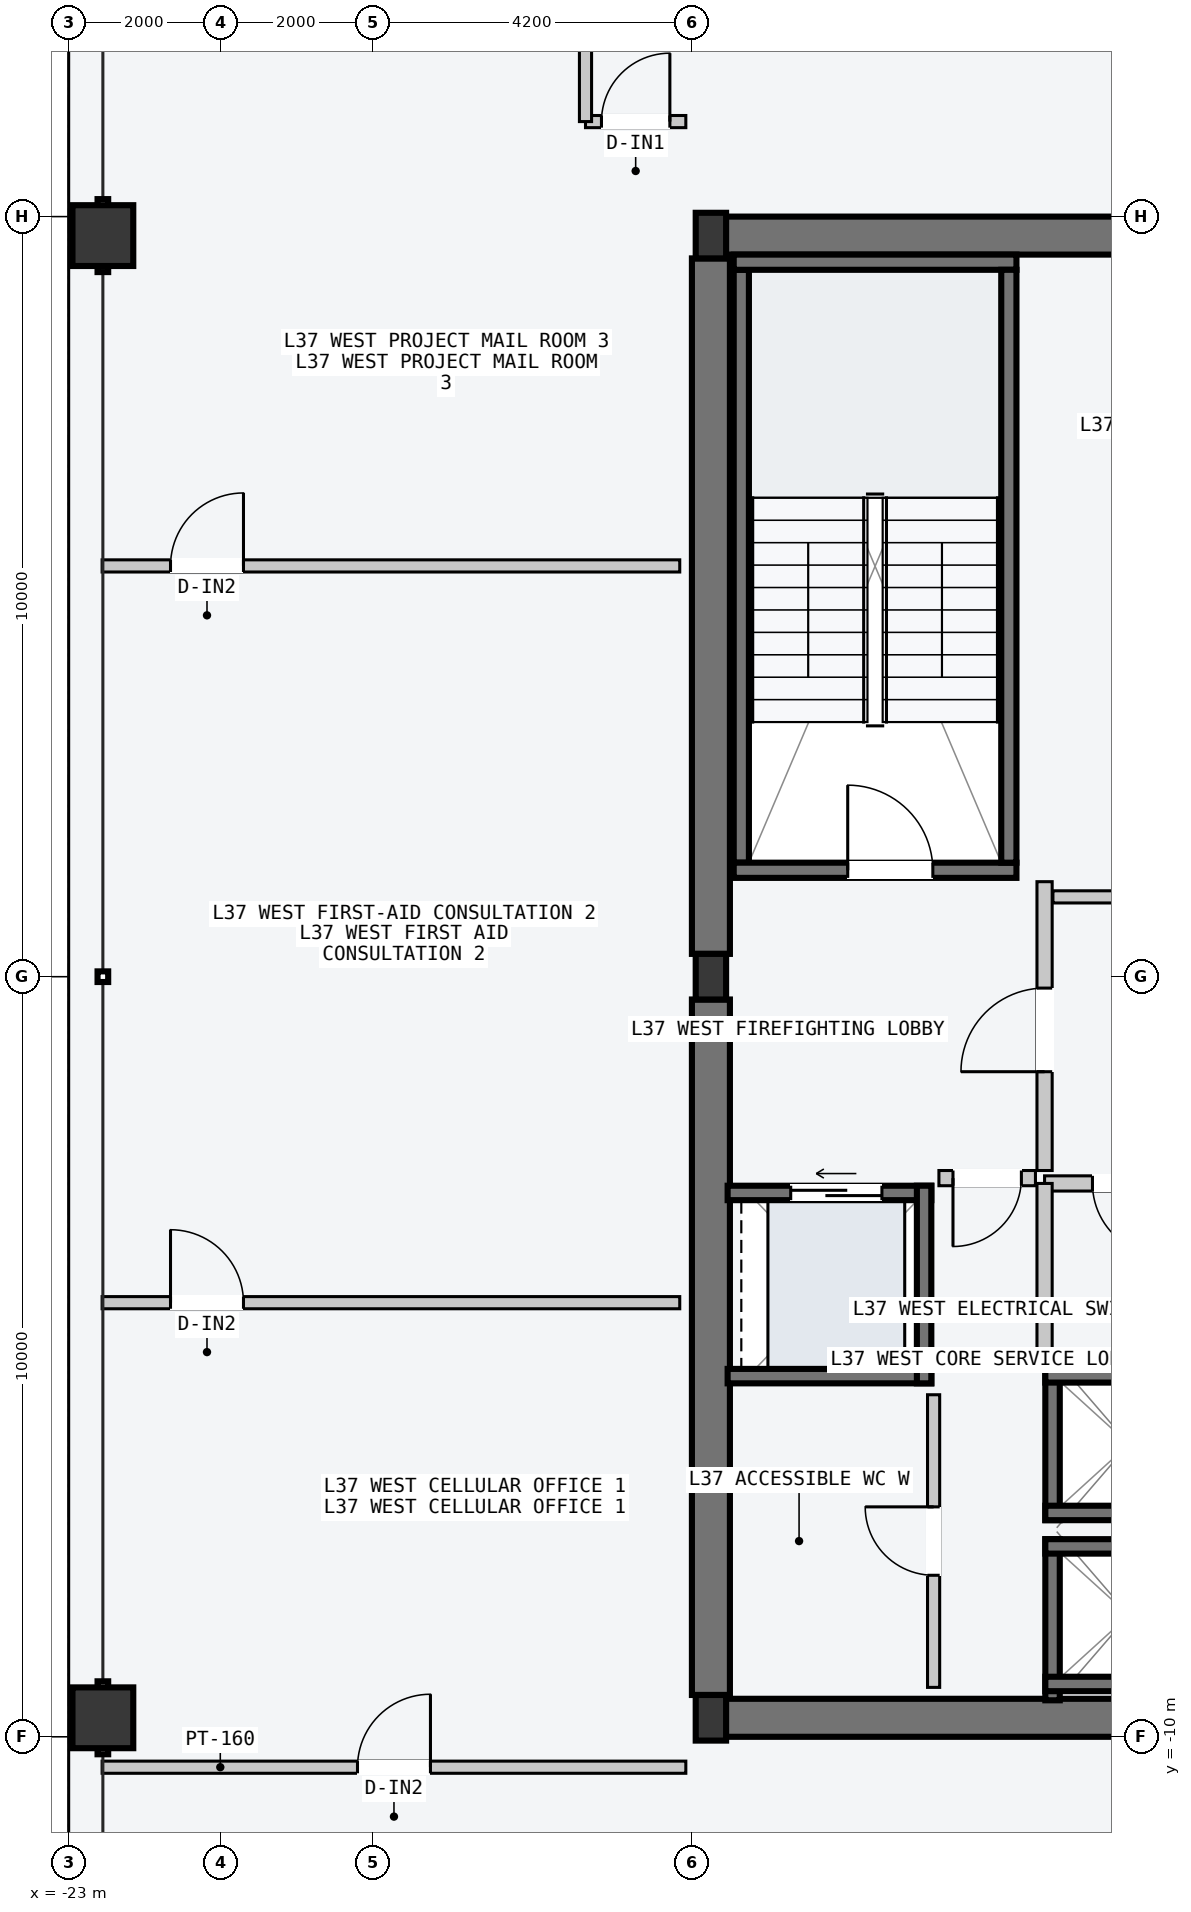
"""IFC4 building model, lengths in metres.
Left out: names, types, materials, properties, quantities, classifications, styles, units other than length and angle.
Written with IfcOpenShell. Run it as: python <this file> out.ifc"""

import sys

from ifc_helpers import new_model, si_unit, direction, frame, frame_2d, origin, origin_2d, place, context, subcontext, project, spatial, rectangle, hollow_rectangle, i_section, extrude, element, fill, save


model = new_model("IFC4")
c1 = context("Model", 3, precision=1e-05, world=origin(), true_north=direction((0.0, 1.0)))
c2 = subcontext(c1, "Body", "Model", "MODEL_VIEW")
j1 = project(units=[si_unit("LENGTHUNIT", "METRE"), si_unit("PLANEANGLEUNIT", "RADIAN")], contexts=[c1])
p1 = place(None, origin())
s1 = spatial("IfcSite", under=j1, at=p1, CompositionType="ELEMENT")
p2 = place(p1, origin())
s2 = spatial("IfcBuilding", under=s1, at=p2, CompositionType="ELEMENT")
p3 = place(p2, frame((0.0, 0.0, 142.2)))
s3 = spatial("IfcBuildingStorey", under=s2, at=p3, CompositionType="ELEMENT", Elevation=142.2)
for number, where, z_axis, x_axis in (
    (1, (-14.53, -9.75, -0.2), (0.0, 0.0, 1.0), (1.0, 0.0, 0.0)),
    (2, (-14.53, 9.75, -0.2), (0.0, 0.0, 1.0), (1.0, 0.0, 0.0)),
):
    element("IfcWall", number, at=place(p3, frame(where, z_axis=z_axis, x_axis=x_axis)), inside=s3, PredefinedType="SHEAR", context=c2, shape_type="SweptSolid", body=[
        extrude(rectangle(XDim=6.46, YDim=0.5, at=frame_2d((3.23, 0.0))), origin(), (0.0, 0.0, 1.0), 3.6),
    ])
for number, where, z_axis, x_axis in (
    (3, (-14.55, -9.45, -0.2), (0.0, 0.0, 1.0), (0.0, 1.0, 0.0)),
    (4, (-14.55, 0.3, -0.2), (0.0, 0.0, 1.0), (0.0, 1.0, 0.0)),
):
    element("IfcWall", number, at=place(p3, frame(where, z_axis=z_axis, x_axis=x_axis)), inside=s3, PredefinedType="SHEAR", context=c2, shape_type="SweptSolid", body=[
        extrude(rectangle(XDim=9.15, YDim=0.5, at=frame_2d((4.575, 0.0))), origin(), (0.0, 0.0, 1.0), 3.6),
    ])
p4 = place(p3, frame((-14.15, 1.5, -0.2), z_axis=(0.0, 0.0, 1.0), x_axis=(0.0, 1.0, 0.0)))
e5 = element("IfcWall", 5, at=p4, inside=s3, PredefinedType="SOLIDWALL", context=c2, shape_type="SweptSolid", body=[
    extrude(rectangle(XDim=7.8, YDim=0.2, at=frame_2d((3.9, 0.0))), origin(), (0.0, 0.0, 1.0), 3.6),
])
p5 = place(p3, frame((-14.25, 1.4, -0.2), z_axis=(0.0, 0.0, 1.0), x_axis=(1.0, 0.0, 0.0)))
e6 = element("IfcWall", 6, at=p5, inside=s3, PredefinedType="SOLIDWALL", context=c2, shape_type="SweptSolid", body=[
    extrude(rectangle(XDim=3.72, YDim=0.2, at=frame_2d((1.86, 0.0))), origin(), (0.0, 0.0, 1.0), 3.6),
])
p6 = place(p5, frame((1.5, 0.0, 0.2)))
e7 = element("IfcOpeningElement", 7, at=p6, cuts=e6, PredefinedType="OPENING", context=c2, shape_type="SweptSolid", body=[
    extrude(rectangle(XDim=1.12, YDim=2.18, at=frame_2d((0.56, 1.09))), frame((0.0, 0.11, 0.0), z_axis=(0.0, -1.0, 0.0), x_axis=(1.0, 0.0, 0.0)), (0.0, 0.0, 1.0), 0.22),
])
p7 = place(p3, frame((-14.25, 9.4, -0.2), z_axis=(0.0, 0.0, 1.0), x_axis=(1.0, 0.0, 0.0)))
e8 = element("IfcWall", 8, at=p7, inside=s3, PredefinedType="SOLIDWALL", context=c2, shape_type="SweptSolid", body=[
    extrude(rectangle(XDim=3.72, YDim=0.2, at=frame_2d((1.86, 0.0))), origin(), (0.0, 0.0, 1.0), 3.6),
])
p8 = place(p3, frame((-10.63, 1.5, -0.2), z_axis=(0.0, 0.0, 1.0), x_axis=(0.0, 1.0, 0.0)))
e9 = element("IfcWall", 9, at=p8, inside=s3, PredefinedType="SOLIDWALL", context=c2, shape_type="SweptSolid", body=[
    extrude(rectangle(XDim=7.8, YDim=0.2, at=frame_2d((3.9, 0.0))), origin(), (0.0, 0.0, 1.0), 3.6),
])
for number, where, z_axis, x_axis in (
    (10, (-14.55, -9.75, 0.0), (0.0, 0.0, 1.0), (1.0, 0.0, 0.0)),
    (11, (-14.55, 0.0, 0.0), (0.0, 0.0, 1.0), (1.0, 0.0, 0.0)),
    (12, (-14.55, 9.75, 0.0), (0.0, 0.0, 1.0), (1.0, 0.0, 0.0)),
):
    element("IfcColumn", number, at=place(p3, frame(where, z_axis=z_axis, x_axis=x_axis)), inside=s3, PredefinedType="COLUMN", context=c2, shape_type="SweptSolid", body=[
        extrude(i_section(OverallWidth=0.4, OverallDepth=0.6, WebThickness=0.022, FlangeThickness=0.036, at=origin_2d()), origin(), (0.0, 0.0, 1.0), 3.6),
    ])
for number, where, z_axis, x_axis in (
    (13, (-22.55, -9.75, 0.0), (0.0, 0.0, 1.0), (0.0, 1.0, 0.0)),
    (14, (-22.55, 9.75, 0.0), (0.0, 0.0, 1.0), (0.0, 1.0, 0.0)),
):
    element("IfcColumn", number, at=place(p3, frame(where, z_axis=z_axis, x_axis=x_axis)), inside=s3, PredefinedType="COLUMN", context=c2, shape_type="SweptSolid", body=[
        extrude(hollow_rectangle(XDim=0.8, YDim=0.8, WallThickness=0.036, at=origin_2d()), origin(), (0.0, 0.0, 1.0), 3.6),
    ])
p9 = place(p3, frame((-10.055, -9.52, -0.2), z_axis=(0.0, 0.0, 1.0), x_axis=(0.0, 1.0, 0.0)))
e15 = element("IfcWall", 15, at=p9, inside=s3, PredefinedType="SOLIDWALL", context=c2, shape_type="SweptSolid", body=[
    extrude(rectangle(XDim=2.12, YDim=0.19, at=frame_2d((1.06, 0.0))), origin(), (0.0, 0.0, 1.0), 3.6),
])
for number, where, z_axis, x_axis in (
    (16, (-10.15, -7.495, -0.2), (0.0, 0.0, 1.0), (1.0, 0.0, 0.0)),
    (17, (-10.15, -9.305, -0.2), (0.0, 0.0, 1.0), (1.0, 0.0, 0.0)),
):
    element("IfcWall", number, at=place(p3, frame(where, z_axis=z_axis, x_axis=x_axis)), inside=s3, PredefinedType="SOLIDWALL", context=c2, shape_type="SweptSolid", body=[
        extrude(rectangle(XDim=2.2, YDim=0.19, at=frame_2d((1.1, 0.0))), origin(), (0.0, 0.0, 1.0), 3.6),
    ])
p10 = place(p3, frame((-10.055, -7.15, -0.2), z_axis=(0.0, 0.0, 1.0), x_axis=(0.0, 1.0, 0.0)))
e18 = element("IfcWall", 18, at=p10, inside=s3, PredefinedType="SOLIDWALL", context=c2, shape_type="SweptSolid", body=[
    extrude(rectangle(XDim=2.0, YDim=0.19, at=frame_2d((1.0, 0.0))), origin(), (0.0, 0.0, 1.0), 3.6),
])
for number, where, z_axis, x_axis in (
    (19, (-10.15, -5.245, -0.2), (0.0, 0.0, 1.0), (1.0, 0.0, 0.0)),
    (20, (-10.15, -7.055, -0.2), (0.0, 0.0, 1.0), (1.0, 0.0, 0.0)),
):
    element("IfcWall", number, at=place(p3, frame(where, z_axis=z_axis, x_axis=x_axis)), inside=s3, PredefinedType="SOLIDWALL", context=c2, shape_type="SweptSolid", body=[
        extrude(rectangle(XDim=2.2, YDim=0.19, at=frame_2d((1.1, 0.0))), origin(), (0.0, 0.0, 1.0), 3.6),
    ])
p11 = place(p3, frame((-14.33, -2.845, -0.2), z_axis=(0.0, 0.0, 1.0), x_axis=(1.0, 0.0, 0.0)))
e21 = element("IfcWall", 21, at=p11, inside=s3, PredefinedType="SOLIDWALL", context=c2, shape_type="SweptSolid", body=[
    extrude(rectangle(XDim=2.68, YDim=0.19, at=frame_2d((1.34, 0.0))), origin(), (0.0, 0.0, 1.0), 3.6),
])
p12 = place(p11, frame((0.83, 0.0, 0.2)))
e22 = element("IfcOpeningElement", 22, at=p12, cuts=e21, PredefinedType="OPENING", context=c2, shape_type="SweptSolid", body=[
    extrude(rectangle(XDim=1.2, YDim=2.2, at=frame_2d((0.6, 1.1))), frame((0.0, 0.105, 0.0), z_axis=(0.0, -1.0, 0.0), x_axis=(1.0, 0.0, 0.0)), (0.0, 0.0, 1.0), 0.21),
])
p13 = place(p3, frame((-14.33, -5.255, -0.2), z_axis=(0.0, 0.0, 1.0), x_axis=(1.0, 0.0, 0.0)))
e23 = element("IfcWall", 23, at=p13, inside=s3, PredefinedType="SOLIDWALL", context=c2, shape_type="SweptSolid", body=[
    extrude(rectangle(XDim=2.68, YDim=0.19, at=frame_2d((1.34, 0.0))), origin(), (0.0, 0.0, 1.0), 3.6),
])
p14 = place(p3, frame((-11.745, -5.35, -0.2), z_axis=(0.0, 0.0, 1.0), x_axis=(0.0, 1.0, 0.0)))
e24 = element("IfcWall", 24, at=p14, inside=s3, PredefinedType="SOLIDWALL", context=c2, shape_type="SweptSolid", body=[
    extrude(rectangle(XDim=2.6, YDim=0.19, at=frame_2d((1.3, 0.0))), origin(), (0.0, 0.0, 1.0), 3.6),
])
p15 = place(p3, frame((-10.16, -2.55, 0.0), z_axis=(0.0, 0.0, 1.0), x_axis=(0.0, 1.0, 0.0)))
e25 = element("IfcWall", 25, at=p15, inside=s3, PredefinedType="PARTITIONING", context=c2, shape_type="SweptSolid", body=[
    extrude(rectangle(XDim=3.8, YDim=0.2, at=frame_2d((1.9, 0.0))), origin(), (0.0, 0.0, 1.0), 3.4),
])
p16 = place(p15, frame((1.3, 0.0, 0.0)))
e26 = element("IfcOpeningElement", 26, at=p16, cuts=e25, PredefinedType="OPENING", context=c2, shape_type="SweptSolid", body=[
    extrude(rectangle(XDim=1.1, YDim=2.15, at=frame_2d((0.55, 1.075))), frame((0.0, 0.11, 0.0), z_axis=(0.0, -1.0, 0.0), x_axis=(1.0, 0.0, 0.0)), (0.0, 0.0, 1.0), 0.22),
])
p17 = place(p3, frame((-10.28, -2.65, 0.0), z_axis=(0.0, 0.0, 1.0), x_axis=(-1.0, 0.0, 0.0)))
e27 = element("IfcWall", 27, at=p17, inside=s3, PredefinedType="PARTITIONING", context=c2, shape_type="SweptSolid", body=[
    extrude(rectangle(XDim=1.27, YDim=0.2, at=frame_2d((0.635, 0.0))), origin(), (0.0, 0.0, 1.0), 3.4),
])
p18 = place(p17, frame((0.185, 0.0, 0.0)))
e28 = element("IfcOpeningElement", 28, at=p18, cuts=e27, PredefinedType="OPENING", context=c2, shape_type="SweptSolid", body=[
    extrude(rectangle(XDim=0.9, YDim=2.15, at=frame_2d((0.45, 1.075))), frame((0.0, 0.11, 0.0), z_axis=(0.0, -1.0, 0.0), x_axis=(1.0, 0.0, 0.0)), (0.0, 0.0, 1.0), 0.22),
])
p19 = place(p3, frame((-7.96, -2.72, 0.0), z_axis=(0.0, 0.0, 1.0), x_axis=(-1.0, 0.0, 0.0)))
e29 = element("IfcWall", 29, at=p19, inside=s3, PredefinedType="PARTITIONING", context=c2, shape_type="SweptSolid", body=[
    extrude(rectangle(XDim=2.2, YDim=0.2, at=frame_2d((1.1, 0.0))), origin(), (0.0, 0.0, 1.0), 3.4),
])
p20 = place(p19, frame((0.62, 0.0, 0.0)))
e30 = element("IfcOpeningElement", 30, at=p20, cuts=e29, PredefinedType="OPENING", context=c2, shape_type="SweptSolid", body=[
    extrude(rectangle(XDim=0.95, YDim=2.1, at=frame_2d((0.475, 1.05))), frame((0.0, 0.11, 0.0), z_axis=(0.0, -1.0, 0.0), x_axis=(1.0, 0.0, 0.0)), (0.0, 0.0, 1.0), 0.22),
])
p21 = place(p3, frame((-10.16, -5.16, 0.0), z_axis=(0.0, 0.0, 1.0), x_axis=(0.0, 1.0, 0.0)))
e31 = element("IfcWall", 31, at=p21, inside=s3, PredefinedType="PARTITIONING", context=c2, shape_type="SweptSolid", body=[
    extrude(rectangle(XDim=2.44, YDim=0.2, at=frame_2d((1.22, 0.0))), origin(), (0.0, 0.0, 1.0), 3.4),
])
p22 = place(p3, frame((-11.62, -9.35, 0.0), z_axis=(0.0, 0.0, 1.0), x_axis=(0.0, 1.0, 0.0)))
e32 = element("IfcWall", 32, at=p22, inside=s3, PredefinedType="PARTITIONING", context=c2, shape_type="SweptSolid", body=[
    extrude(rectangle(XDim=3.85, YDim=0.16, at=frame_2d((1.925, 0.0))), origin(), (0.0, 0.0, 1.0), 3.4),
])
p23 = place(p22, frame((1.475, 0.0, 0.0)))
e33 = element("IfcOpeningElement", 33, at=p23, cuts=e32, PredefinedType="OPENING", context=c2, shape_type="SweptSolid", body=[
    extrude(rectangle(XDim=0.9, YDim=2.15, at=frame_2d((0.45, 1.075))), frame((0.0, 0.09, 0.0), z_axis=(0.0, -1.0, 0.0), x_axis=(1.0, 0.0, 0.0)), (0.0, 0.0, 1.0), 0.18),
])
p24 = place(p3, frame((-10.05, 1.05, 0.0), z_axis=(0.0, 0.0, 1.0), x_axis=(1.0, 0.0, 0.0)))
e34 = element("IfcWall", 34, at=p24, inside=s3, PredefinedType="PARTITIONING", context=c2, shape_type="SweptSolid", body=[
    extrude(rectangle(XDim=6.21, YDim=0.16, at=frame_2d((3.105, 0.0))), origin(), (0.0, 0.0, 1.0), 3.4),
])
p25 = place(p3, frame((-22.56, -10.4, 0.0), z_axis=(0.0, 0.0, 1.0), x_axis=(1.0, 0.0, 0.0)))
e35 = element("IfcWall", 35, at=p25, inside=s3, PredefinedType="PARTITIONING", context=c2, shape_type="SweptSolid", body=[
    extrude(rectangle(XDim=7.68, YDim=0.16, at=frame_2d((3.84, 0.0))), origin(), (0.0, 0.0, 1.0), 3.4),
])
p26 = place(p25, frame((3.36, 0.0, 0.0)))
e36 = element("IfcOpeningElement", 36, at=p26, cuts=e35, PredefinedType="OPENING", context=c2, shape_type="SweptSolid", body=[
    extrude(rectangle(XDim=0.96, YDim=2.18, at=frame_2d((0.48, 1.09))), frame((0.0, 0.09, 0.0), z_axis=(0.0, -1.0, 0.0), x_axis=(1.0, 0.0, 0.0)), (0.0, 0.0, 1.0), 0.18),
])
p27 = place(p3, frame((-16.2, 11.25, 0.0), z_axis=(0.0, 0.0, 1.0), x_axis=(1.0, 0.0, 0.0)))
e37 = element("IfcWall", 37, at=p27, inside=s3, PredefinedType="PARTITIONING", context=c2, shape_type="SweptSolid", body=[
    extrude(rectangle(XDim=1.32, YDim=0.16, at=frame_2d((0.66, 0.0))), origin(), (0.0, 0.0, 1.0), 3.4),
])
p28 = place(p27, frame((0.21, 0.0, 0.0)))
e38 = element("IfcOpeningElement", 38, at=p28, cuts=e37, PredefinedType="OPENING", context=c2, shape_type="SweptSolid", body=[
    extrude(rectangle(XDim=0.9, YDim=2.15, at=frame_2d((0.45, 1.075))), frame((0.0, 0.09, 0.0), z_axis=(0.0, -1.0, 0.0), x_axis=(1.0, 0.0, 0.0)), (0.0, 0.0, 1.0), 0.18),
])
p29 = place(p3, frame((-16.2, 11.25, 0.0), z_axis=(0.0, 0.0, 1.0), x_axis=(0.0, 1.0, 0.0)))
e39 = element("IfcWall", 39, at=p29, inside=s3, PredefinedType="PARTITIONING", context=c2, shape_type="SweptSolid", body=[
    extrude(rectangle(XDim=1.95, YDim=0.16, at=frame_2d((0.975, 0.0))), origin(), (0.0, 0.0, 1.0), 3.4),
])
p30 = place(p3, frame((-22.56, -4.289, 0.0), z_axis=(0.0, 0.0, 1.0), x_axis=(1.0, 0.0, 0.0)))
e40 = element("IfcWall", 40, at=p30, inside=s3, PredefinedType="PARTITIONING", context=c2, shape_type="SweptSolid", body=[
    extrude(rectangle(XDim=7.6, YDim=0.16, at=frame_2d((3.8, 0.0))), origin(), (0.0, 0.0, 1.0), 3.4),
])
p31 = place(p30, frame((0.9, 0.0, 0.0)))
e41 = element("IfcOpeningElement", 41, at=p31, cuts=e40, PredefinedType="OPENING", context=c2, shape_type="SweptSolid", body=[
    extrude(rectangle(XDim=0.96, YDim=2.18, at=frame_2d((0.48, 1.09))), frame((0.0, 0.09, 0.0), z_axis=(0.0, -1.0, 0.0), x_axis=(1.0, 0.0, 0.0)), (0.0, 0.0, 1.0), 0.18),
])
p32 = place(p3, frame((-22.56, 5.404, 0.0), z_axis=(0.0, 0.0, 1.0), x_axis=(1.0, 0.0, 0.0)))
e42 = element("IfcWall", 42, at=p32, inside=s3, PredefinedType="PARTITIONING", context=c2, shape_type="SweptSolid", body=[
    extrude(rectangle(XDim=7.6, YDim=0.16, at=frame_2d((3.8, 0.0))), origin(), (0.0, 0.0, 1.0), 3.4),
])
p33 = place(p32, frame((0.9, 0.0, 0.0)))
e43 = element("IfcOpeningElement", 43, at=p33, cuts=e42, PredefinedType="OPENING", context=c2, shape_type="SweptSolid", body=[
    extrude(rectangle(XDim=0.96, YDim=2.18, at=frame_2d((0.48, 1.09))), frame((0.0, 0.09, 0.0), z_axis=(0.0, -1.0, 0.0), x_axis=(1.0, 0.0, 0.0)), (0.0, 0.0, 1.0), 0.18),
])
p34 = place(p6, origin())
e44 = element("IfcDoor", 44, at=p34, inside=s3, OperationType="SINGLE_SWING_LEFT", PredefinedType="DOOR", context=c2, shape_type="SweptSolid", body=[
    extrude(rectangle(XDim=1.12, YDim=2.18, at=frame_2d((0.56, 1.09))), frame((0.0, 0.025, 0.0), z_axis=(0.0, -1.0, 0.0), x_axis=(1.0, 0.0, 0.0)), (0.0, 0.0, 1.0), 0.05),
])
fill(e7, e44)
p35 = place(p12, origin())
e45 = element("IfcDoor", 45, at=p35, inside=s3, OperationType="SLIDING_TO_LEFT", PredefinedType="DOOR", context=c2, shape_type="SweptSolid", body=[
    extrude(rectangle(XDim=1.2, YDim=2.2, at=frame_2d((0.6, 1.1))), frame((0.0, 0.025, 0.0), z_axis=(0.0, -1.0, 0.0), x_axis=(1.0, 0.0, 0.0)), (0.0, 0.0, 1.0), 0.05),
])
fill(e22, e45)
p36 = place(p16, origin())
e46 = element("IfcDoor", 46, at=p36, inside=s3, OperationType="SINGLE_SWING_LEFT", PredefinedType="DOOR", context=c2, shape_type="SweptSolid", body=[
    extrude(rectangle(XDim=1.1, YDim=2.15, at=frame_2d((0.55, 1.075))), frame((0.0, 0.025, 0.0), z_axis=(0.0, -1.0, 0.0), x_axis=(1.0, 0.0, 0.0)), (0.0, 0.0, 1.0), 0.05),
])
fill(e26, e46)
p37 = place(p18, origin())
e47 = element("IfcDoor", 47, at=p37, inside=s3, OperationType="SINGLE_SWING_RIGHT", PredefinedType="DOOR", context=c2, shape_type="SweptSolid", body=[
    extrude(rectangle(XDim=0.9, YDim=2.15, at=frame_2d((0.45, 1.075))), frame((0.0, 0.025, 0.0), z_axis=(0.0, -1.0, 0.0), x_axis=(1.0, 0.0, 0.0)), (0.0, 0.0, 1.0), 0.05),
])
fill(e28, e47)
p38 = place(p20, origin())
e48 = element("IfcDoor", 48, at=p38, inside=s3, OperationType="SINGLE_SWING_LEFT", PredefinedType="DOOR", context=c2, shape_type="SweptSolid", body=[
    extrude(rectangle(XDim=0.95, YDim=2.1, at=frame_2d((0.475, 1.05))), frame((0.0, 0.025, 0.0), z_axis=(0.0, -1.0, 0.0), x_axis=(1.0, 0.0, 0.0)), (0.0, 0.0, 1.0), 0.05),
])
fill(e30, e48)
p39 = place(p23, origin())
e49 = element("IfcDoor", 49, at=p39, inside=s3, OperationType="SINGLE_SWING_RIGHT", PredefinedType="DOOR", context=c2, shape_type="SweptSolid", body=[
    extrude(rectangle(XDim=0.9, YDim=2.15, at=frame_2d((0.45, 1.075))), frame((0.0, 0.025, 0.0), z_axis=(0.0, -1.0, 0.0), x_axis=(1.0, 0.0, 0.0)), (0.0, 0.0, 1.0), 0.05),
])
fill(e33, e49)
p40 = place(p26, origin())
e50 = element("IfcDoor", 50, at=p40, inside=s3, OperationType="SINGLE_SWING_RIGHT", PredefinedType="DOOR", context=c2, shape_type="SweptSolid", body=[
    extrude(rectangle(XDim=0.96, YDim=2.18, at=frame_2d((0.48, 1.09))), frame((0.0, 0.025, 0.0), z_axis=(0.0, -1.0, 0.0), x_axis=(1.0, 0.0, 0.0)), (0.0, 0.0, 1.0), 0.05),
])
fill(e36, e50)
p41 = place(p28, origin())
e51 = element("IfcDoor", 51, at=p41, inside=s3, OperationType="SINGLE_SWING_RIGHT", PredefinedType="DOOR", context=c2, shape_type="SweptSolid", body=[
    extrude(rectangle(XDim=0.9, YDim=2.15, at=frame_2d((0.45, 1.075))), frame((0.0, 0.025, 0.0), z_axis=(0.0, -1.0, 0.0), x_axis=(1.0, 0.0, 0.0)), (0.0, 0.0, 1.0), 0.05),
])
fill(e38, e51)
p42 = place(p31, origin())
e52 = element("IfcDoor", 52, at=p42, inside=s3, OperationType="SINGLE_SWING_LEFT", PredefinedType="DOOR", context=c2, shape_type="SweptSolid", body=[
    extrude(rectangle(XDim=0.96, YDim=2.18, at=frame_2d((0.48, 1.09))), frame((0.0, 0.025, 0.0), z_axis=(0.0, -1.0, 0.0), x_axis=(1.0, 0.0, 0.0)), (0.0, 0.0, 1.0), 0.05),
])
fill(e41, e52)
p43 = place(p33, origin())
e53 = element("IfcDoor", 53, at=p43, inside=s3, OperationType="SINGLE_SWING_RIGHT", PredefinedType="DOOR", context=c2, shape_type="SweptSolid", body=[
    extrude(rectangle(XDim=0.96, YDim=2.18, at=frame_2d((0.48, 1.09))), frame((0.0, 0.025, 0.0), z_axis=(0.0, -1.0, 0.0), x_axis=(1.0, 0.0, 0.0)), (0.0, 0.0, 1.0), 0.05),
])
fill(e43, e53)
save(model, sys.argv[1])
